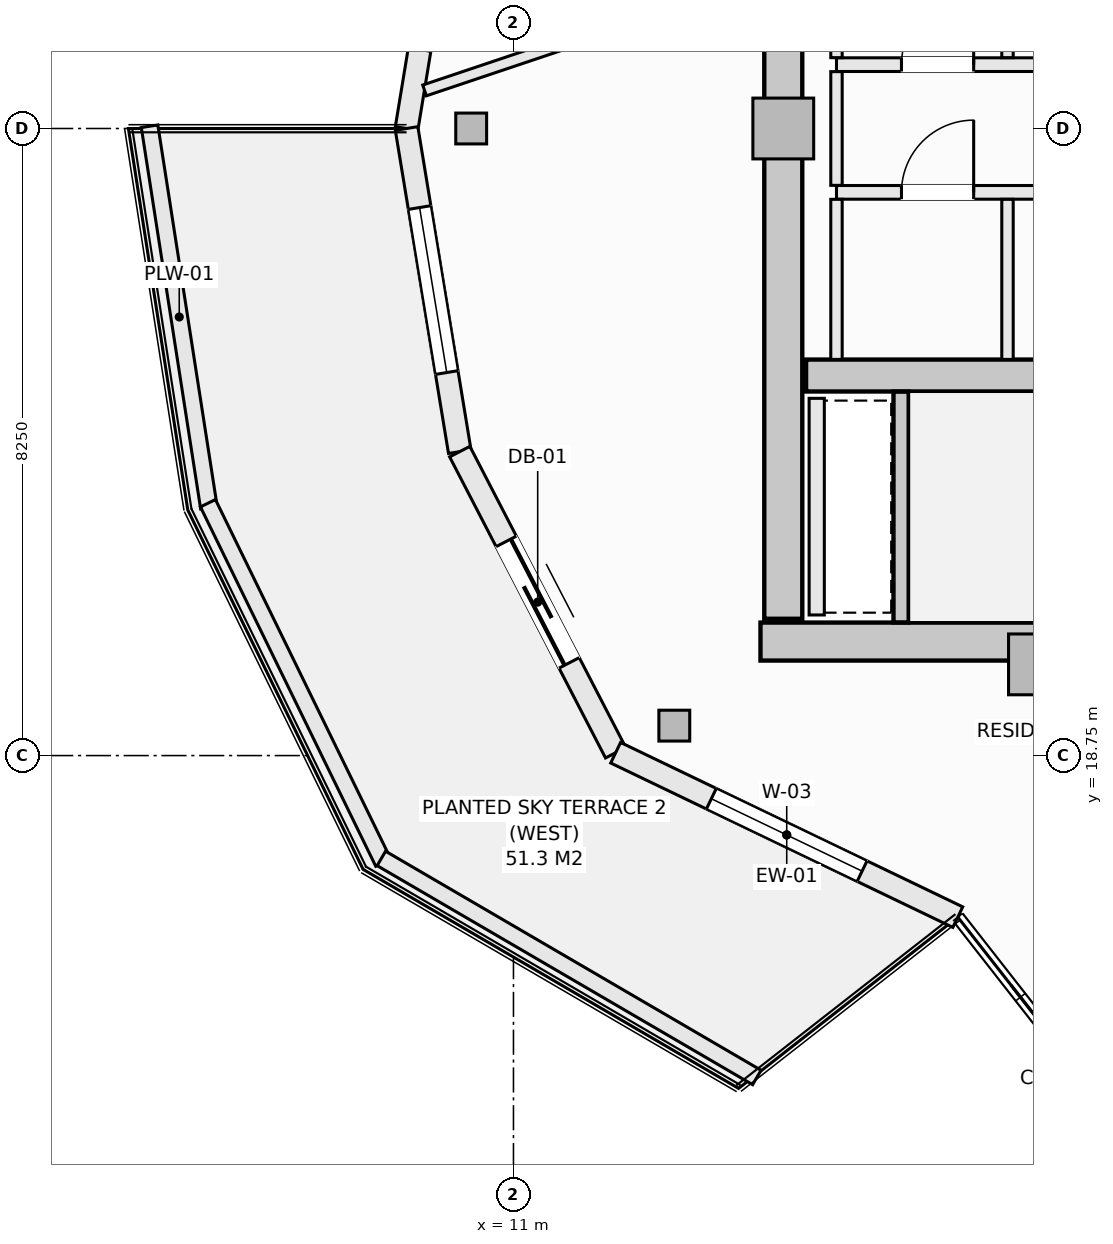
"""IFC4 building model, lengths in metres.
Left out: names, types, materials, properties, quantities, classifications, styles, units other than length and angle.
Written with IfcOpenShell. Run it as: python <this file> out.ifc"""

import sys

from ifc_helpers import new_model, si_unit, direction, frame, frame_2d, origin, origin_2d, place, context, subcontext, project, spatial, rectangle, hollow_rectangle, extrude, element, fill, save


model = new_model("IFC4")
c1 = context("Model", 3, precision=1e-05, world=origin(), true_north=direction((0.0, 1.0)))
c2 = subcontext(c1, "Body", "Model", "MODEL_VIEW")
j1 = project(units=[si_unit("LENGTHUNIT", "METRE"), si_unit("PLANEANGLEUNIT", "RADIAN")], contexts=[c1])
p1 = place(None, origin())
s1 = spatial("IfcSite", under=j1, at=p1, CompositionType="ELEMENT")
p2 = place(p1, origin())
s2 = spatial("IfcBuilding", under=s1, at=p2, CompositionType="ELEMENT")
p3 = place(p2, frame((0.0, 0.0, 272.3)))
s3 = spatial("IfcBuildingStorey", under=s2, at=p3, CompositionType="ELEMENT", Elevation=272.3)
p4 = place(p3, frame((14.25, 20.25, -0.27), z_axis=(0.0, 0.0, 1.0), x_axis=(1.0, 0.0, 0.0)))
e1 = element("IfcWall", 1, at=p4, inside=s3, PredefinedType="SHEAR", context=c2, shape_type="SweptSolid", body=[
    extrude(rectangle(XDim=13.5, YDim=0.5, at=frame_2d((6.75, 0.0))), origin(), (0.0, 0.0, 1.0), 3.25),
])
p5 = place(p3, frame((14.55, 20.55, -0.27), z_axis=(0.0, 0.0, 1.0), x_axis=(0.0, 1.0, 0.0)))
e2 = element("IfcWall", 2, at=p5, inside=s3, PredefinedType="SHEAR", context=c2, shape_type="SweptSolid", body=[
    extrude(rectangle(XDim=12.9, YDim=0.5, at=frame_2d((6.45, 0.0))), origin(), (0.0, 0.0, 1.0), 3.25),
])
p6 = place(p3, frame((14.85, 23.75, -0.27), z_axis=(0.0, 0.0, 1.0), x_axis=(1.0, 0.0, 0.0)))
e3 = element("IfcWall", 3, at=p6, inside=s3, PredefinedType="SHEAR", context=c2, shape_type="SweptSolid", body=[
    extrude(rectangle(XDim=7.3, YDim=0.42, at=frame_2d((3.65, 0.0))), origin(), (0.0, 0.0, 1.0), 3.25),
])
for number, where, z_axis, x_axis in (
    (4, (10.444, 27.0, -0.27), (0.0, 0.0, 1.0), (1.0, 0.0, 0.0)),
    (5, (13.116, 19.144, -0.27), (0.0, 0.0, 1.0), (1.0, 0.0, 0.0)),
):
    element("IfcColumn", number, at=place(p3, frame(where, z_axis=z_axis, x_axis=x_axis)), inside=s3, PredefinedType="COLUMN", context=c2, shape_type="SweptSolid", body=[
        extrude(hollow_rectangle(XDim=0.406, YDim=0.406, WallThickness=0.016, at=origin_2d()), origin(), (0.0, 0.0, 1.0), 3.25),
    ])
for number, where, z_axis, x_axis in (
    (6, (14.55, 27.0, -0.27), (0.0, 0.0, 1.0), (1.0, 0.0, 0.0)),
    (7, (17.914, 19.95, -0.27), (0.0, 0.0, 1.0), (1.0, 0.0, 0.0)),
):
    element("IfcColumn", number, at=place(p3, frame(where, z_axis=z_axis, x_axis=x_axis)), inside=s3, PredefinedType="PILASTER", context=c2, shape_type="SweptSolid", body=[
        extrude(rectangle(XDim=0.8, YDim=0.8, at=origin_2d()), origin(), (0.0, 0.0, 1.0), 3.25),
    ])
p7 = place(p3, frame((9.594, 27.0, 0.0), z_axis=(0.0, 0.0, 1.0), x_axis=(0.162404622434, 0.98672424649, 0.0)))
e8 = element("IfcWall", 8, at=p7, inside=s3, PredefinedType="SOLIDWALL", context=c2, shape_type="SweptSolid", body=[
    extrude(rectangle(XDim=4.308, YDim=0.3, at=frame_2d((2.154, 0.0))), origin(), (0.0, 0.0, 1.0), 2.555),
])
p8 = place(p7, frame((1.054, 0.0, 0.72)))
e9 = element("IfcOpeningElement", 9, at=p8, cuts=e8, PredefinedType="OPENING", context=c2, shape_type="SweptSolid", body=[
    extrude(rectangle(XDim=2.2, YDim=1.65, at=frame_2d((1.1, 0.825))), frame((0.0, 0.16, 0.0), z_axis=(0.0, -1.0, 0.0), x_axis=(1.0, 0.0, 0.0)), (0.0, 0.0, 1.0), 0.32),
])
p9 = place(p3, frame((9.594, 27.0, 0.0), z_axis=(0.0, 0.0, 1.0), x_axis=(0.162404622434, -0.98672424649, 0.0)))
e10 = element("IfcWall", 10, at=p9, inside=s3, PredefinedType="SOLIDWALL", context=c2, shape_type="SweptSolid", body=[
    extrude(rectangle(XDim=4.308, YDim=0.3, at=frame_2d((2.154, 0.0))), origin(), (0.0, 0.0, 1.0), 2.555),
])
p10 = place(p9, frame((1.054, 0.0, 0.72)))
e11 = element("IfcOpeningElement", 11, at=p10, cuts=e10, PredefinedType="OPENING", context=c2, shape_type="SweptSolid", body=[
    extrude(rectangle(XDim=2.2, YDim=1.65, at=frame_2d((1.1, 0.825))), frame((0.0, 0.16, 0.0), z_axis=(0.0, -1.0, 0.0), x_axis=(1.0, 0.0, 0.0)), (0.0, 0.0, 1.0), 0.32),
])
p11 = place(p3, frame((10.293, 22.749, 0.0), z_axis=(0.0, 0.0, 1.0), x_axis=(0.459801070243, -0.888021945564, 0.0)))
e12 = element("IfcWall", 12, at=p11, inside=s3, PredefinedType="SOLIDWALL", context=c2, shape_type="SweptSolid", body=[
    extrude(rectangle(XDim=4.461, YDim=0.3, at=frame_2d((2.23, 0.0))), origin(), (0.0, 0.0, 1.0), 2.555),
])
p12 = place(p11, frame((1.33, 0.0, 0.0)))
e13 = element("IfcOpeningElement", 13, at=p12, cuts=e12, PredefinedType="OPENING", context=c2, shape_type="SweptSolid", body=[
    extrude(rectangle(XDim=1.8, YDim=2.25, at=frame_2d((0.9, 1.125))), frame((0.0, 0.16, 0.0), z_axis=(0.0, -1.0, 0.0), x_axis=(1.0, 0.0, 0.0)), (0.0, 0.0, 1.0), 0.32),
])
p13 = place(p3, frame((12.344, 18.788, 0.0), z_axis=(0.0, 0.0, 1.0), x_axis=(0.901346013132, -0.433099716706, 0.0)))
e14 = element("IfcWall", 14, at=p13, inside=s3, PredefinedType="SOLIDWALL", context=c2, shape_type="SweptSolid", body=[
    extrude(rectangle(XDim=4.994, YDim=0.3, at=frame_2d((2.497, 0.0))), origin(), (0.0, 0.0, 1.0), 2.555),
])
p14 = place(p13, frame((1.397, 0.0, 0.72)))
e15 = element("IfcOpeningElement", 15, at=p14, cuts=e14, PredefinedType="OPENING", context=c2, shape_type="SweptSolid", body=[
    extrude(rectangle(XDim=2.2, YDim=1.65, at=frame_2d((1.1, 0.825))), frame((0.0, 0.16, 0.0), z_axis=(0.0, -1.0, 0.0), x_axis=(1.0, 0.0, 0.0)), (0.0, 0.0, 1.0), 0.32),
])
p15 = place(p3, frame((6.212, 27.029, 0.0), z_axis=(0.0, 0.0, 1.0), x_axis=(0.15374038442, -0.988111276223, 0.0)))
e16 = element("IfcWall", 16, at=p15, inside=s3, PredefinedType="PARAPET", context=c2, shape_type="SweptSolid", body=[
    extrude(rectangle(XDim=5.078, YDim=0.22, at=frame_2d((2.539, 0.0))), origin(), (0.0, 0.0, 1.0), 0.52),
])
p16 = place(p3, frame((6.98, 22.07, 0.0), z_axis=(0.0, 0.0, 1.0), x_axis=(0.438469339137, -0.898746148051, 0.0)))
e17 = element("IfcWall", 17, at=p16, inside=s3, PredefinedType="PARAPET", context=c2, shape_type="SweptSolid", body=[
    extrude(rectangle(XDim=5.262, YDim=0.22, at=frame_2d((2.631, 0.0))), origin(), (0.0, 0.0, 1.0), 0.52),
])
p17 = place(p3, frame((9.262, 17.397, 0.0), z_axis=(0.0, 0.0, 1.0), x_axis=(0.863803671285, -0.503828559606, 0.0)))
e18 = element("IfcWall", 18, at=p17, inside=s3, PredefinedType="PARAPET", context=c2, shape_type="SweptSolid", body=[
    extrude(rectangle(XDim=5.719, YDim=0.22, at=frame_2d((2.86, 0.0))), origin(), (0.0, 0.0, 1.0), 0.52),
])
p18 = place(p3, frame((16.1, 20.502, -0.27), z_axis=(0.0, 0.0, 1.0), x_axis=(0.0, 1.0, 0.0)))
e19 = element("IfcWall", 19, at=p18, inside=s3, PredefinedType="SHEAR", context=c2, shape_type="SweptSolid", body=[
    extrude(rectangle(XDim=3.036, YDim=0.2, at=frame_2d((1.518, 0.0))), origin(), (0.0, 0.0, 1.0), 3.25),
])
p19 = place(p3, frame((14.99, 20.6, 0.0), z_axis=(0.0, 0.0, 1.0), x_axis=(0.0, 1.0, 0.0)))
e20 = element("IfcWall", 20, at=p19, inside=s3, PredefinedType="SOLIDWALL", context=c2, shape_type="SweptSolid", body=[
    extrude(rectangle(XDim=2.85, YDim=0.2, at=frame_2d((1.425, 0.0))), origin(), (0.0, 0.0, 1.0), 2.98),
])
p20 = place(p3, frame((15.25, 27.84, 0.0), z_axis=(0.0, 0.0, 1.0), x_axis=(1.0, 0.0, 0.0)))
e21 = element("IfcWall", 21, at=p20, inside=s3, PredefinedType="SOLIDWALL", context=c2, shape_type="SweptSolid", body=[
    extrude(rectangle(XDim=6.9, YDim=0.18, at=frame_2d((3.45, 0.0))), origin(), (0.0, 0.0, 1.0), 2.98),
])
p21 = place(p20, frame((5.02, 0.0, 0.0)))
e22 = element("IfcOpeningElement", 22, at=p21, cuts=e21, PredefinedType="OPENING", context=c2, shape_type="SweptSolid", body=[
    extrude(rectangle(XDim=0.95, YDim=2.1, at=frame_2d((0.475, 1.05))), frame((0.0, 0.1, 0.0), z_axis=(0.0, -1.0, 0.0), x_axis=(1.0, 0.0, 0.0)), (0.0, 0.0, 1.0), 0.2),
])
p22 = place(p20, frame((0.855, 0.0, 0.0)))
e23 = element("IfcOpeningElement", 23, at=p22, cuts=e21, PredefinedType="OPENING", context=c2, shape_type="SweptSolid", body=[
    extrude(rectangle(XDim=0.95, YDim=2.1, at=frame_2d((0.475, 1.05))), frame((0.0, 0.1, 0.0), z_axis=(0.0, -1.0, 0.0), x_axis=(1.0, 0.0, 0.0)), (0.0, 0.0, 1.0), 0.2),
])
p23 = place(p20, frame((2.9, 0.0, 0.0)))
e24 = element("IfcOpeningElement", 24, at=p23, cuts=e21, PredefinedType="OPENING", context=c2, shape_type="SweptSolid", body=[
    extrude(rectangle(XDim=0.95, YDim=2.1, at=frame_2d((0.475, 1.05))), frame((0.0, 0.1, 0.0), z_axis=(0.0, -1.0, 0.0), x_axis=(1.0, 0.0, 0.0)), (0.0, 0.0, 1.0), 0.2),
])
p24 = place(p3, frame((15.25, 26.16, 0.0), z_axis=(0.0, 0.0, 1.0), x_axis=(1.0, 0.0, 0.0)))
e25 = element("IfcWall", 25, at=p24, inside=s3, PredefinedType="SOLIDWALL", context=c2, shape_type="SweptSolid", body=[
    extrude(rectangle(XDim=6.9, YDim=0.18, at=frame_2d((3.45, 0.0))), origin(), (0.0, 0.0, 1.0), 2.98),
])
p25 = place(p24, frame((5.02, 0.0, 0.0)))
e26 = element("IfcOpeningElement", 26, at=p25, cuts=e25, PredefinedType="OPENING", context=c2, shape_type="SweptSolid", body=[
    extrude(rectangle(XDim=0.95, YDim=2.1, at=frame_2d((0.475, 1.05))), frame((0.0, 0.1, 0.0), z_axis=(0.0, -1.0, 0.0), x_axis=(1.0, 0.0, 0.0)), (0.0, 0.0, 1.0), 0.2),
])
p26 = place(p24, frame((0.855, 0.0, 0.0)))
e27 = element("IfcOpeningElement", 27, at=p26, cuts=e25, PredefinedType="OPENING", context=c2, shape_type="SweptSolid", body=[
    extrude(rectangle(XDim=0.95, YDim=2.1, at=frame_2d((0.475, 1.05))), frame((0.0, 0.1, 0.0), z_axis=(0.0, -1.0, 0.0), x_axis=(1.0, 0.0, 0.0)), (0.0, 0.0, 1.0), 0.2),
])
p27 = place(p24, frame((2.9, 0.0, 0.0)))
e28 = element("IfcOpeningElement", 28, at=p27, cuts=e25, PredefinedType="OPENING", context=c2, shape_type="SweptSolid", body=[
    extrude(rectangle(XDim=0.95, YDim=2.1, at=frame_2d((0.475, 1.05))), frame((0.0, 0.1, 0.0), z_axis=(0.0, -1.0, 0.0), x_axis=(1.0, 0.0, 0.0)), (0.0, 0.0, 1.0), 0.2),
])
p28 = place(p3, frame((15.25, 23.962, 0.0), z_axis=(0.0, 0.0, 1.0), x_axis=(0.0, 1.0, 0.0)))
e29 = element("IfcWall", 29, at=p28, inside=s3, PredefinedType="PARTITIONING", context=c2, shape_type="SweptSolid", body=[
    extrude(rectangle(XDim=2.106, YDim=0.15, at=frame_2d((1.053, 0.0))), origin(), (0.0, 0.0, 1.0), 2.98),
])
p29 = place(p3, frame((15.25, 26.252, 0.0), z_axis=(0.0, 0.0, 1.0), x_axis=(0.0, 1.0, 0.0)))
e30 = element("IfcWall", 30, at=p29, inside=s3, PredefinedType="PARTITIONING", context=c2, shape_type="SweptSolid", body=[
    extrude(rectangle(XDim=1.496, YDim=0.15, at=frame_2d((0.748, 0.0))), origin(), (0.0, 0.0, 1.0), 2.98),
])
for number, where, z_axis, x_axis in (
    (31, (15.25, 27.932, 0.0), (0.0, 0.0, 1.0), (0.0, 1.0, 0.0)),
    (32, (17.5, 23.962, 0.0), (0.0, 0.0, 1.0), (0.0, 1.0, 0.0)),
    (33, (17.5, 27.932, 0.0), (0.0, 0.0, 1.0), (0.0, 1.0, 0.0)),
):
    element("IfcWall", number, at=place(p3, frame(where, z_axis=z_axis, x_axis=x_axis)), inside=s3, PredefinedType="PARTITIONING", context=c2, shape_type="SweptSolid", body=[
        extrude(rectangle(XDim=2.106, YDim=0.15, at=frame_2d((1.053, 0.0))), origin(), (0.0, 0.0, 1.0), 2.98),
    ])
p30 = place(p3, frame((9.83, 27.501, 0.0), z_axis=(0.0, 0.0, 1.0), x_axis=(0.948028536058, 0.318185315217, 0.0)))
e34 = element("IfcWall", 34, at=p30, inside=s3, PredefinedType="PARTITIONING", context=c2, shape_type="SweptSolid", body=[
    extrude(rectangle(XDim=4.713, YDim=0.15, at=frame_2d((2.356, 0.0))), origin(), (0.0, 0.0, 1.0), 2.98),
])
p31 = place(p10, origin())
e35 = element("IfcWindow", 35, at=p31, inside=s3, PartitioningType="SINGLE_PANEL", PredefinedType="WINDOW", context=c2, shape_type="SweptSolid", body=[
    extrude(rectangle(XDim=2.2, YDim=1.65, at=frame_2d((1.1, 0.825))), frame((0.0, 0.03, 0.0), z_axis=(0.0, -1.0, 0.0), x_axis=(1.0, 0.0, 0.0)), (0.0, 0.0, 1.0), 0.06),
])
fill(e11, e35)
p32 = place(p12, frame((1.8, 0.0, 0.0), z_axis=(0.0, 0.0, 1.0), x_axis=(-1.0, 0.0, 0.0)))
e36 = element("IfcDoor", 36, at=p32, inside=s3, OperationType="SLIDING_TO_LEFT", PredefinedType="DOOR", context=c2, shape_type="SweptSolid", body=[
    extrude(rectangle(XDim=1.8, YDim=2.25, at=frame_2d((0.9, 1.125))), frame((0.0, 0.025, 0.0), z_axis=(0.0, -1.0, 0.0), x_axis=(1.0, 0.0, 0.0)), (0.0, 0.0, 1.0), 0.05),
])
fill(e13, e36)
p33 = place(p14, origin())
e37 = element("IfcWindow", 37, at=p33, inside=s3, PartitioningType="SINGLE_PANEL", PredefinedType="WINDOW", context=c2, shape_type="SweptSolid", body=[
    extrude(rectangle(XDim=2.2, YDim=1.65, at=frame_2d((1.1, 0.825))), frame((0.0, 0.03, 0.0), z_axis=(0.0, -1.0, 0.0), x_axis=(1.0, 0.0, 0.0)), (0.0, 0.0, 1.0), 0.06),
])
fill(e15, e37)
p34 = place(p22, origin())
e38 = element("IfcDoor", 38, at=p34, inside=s3, OperationType="SINGLE_SWING_RIGHT", PredefinedType="DOOR", context=c2, shape_type="SweptSolid", body=[
    extrude(rectangle(XDim=0.95, YDim=2.1, at=frame_2d((0.475, 1.05))), frame((0.0, 0.025, 0.0), z_axis=(0.0, -1.0, 0.0), x_axis=(1.0, 0.0, 0.0)), (0.0, 0.0, 1.0), 0.05),
])
fill(e23, e38)
p35 = place(p26, origin())
e39 = element("IfcDoor", 39, at=p35, inside=s3, OperationType="SINGLE_SWING_RIGHT", PredefinedType="DOOR", context=c2, shape_type="SweptSolid", body=[
    extrude(rectangle(XDim=0.95, YDim=2.1, at=frame_2d((0.475, 1.05))), frame((0.0, 0.025, 0.0), z_axis=(0.0, -1.0, 0.0), x_axis=(1.0, 0.0, 0.0)), (0.0, 0.0, 1.0), 0.05),
])
fill(e27, e39)
save(model, sys.argv[1])
